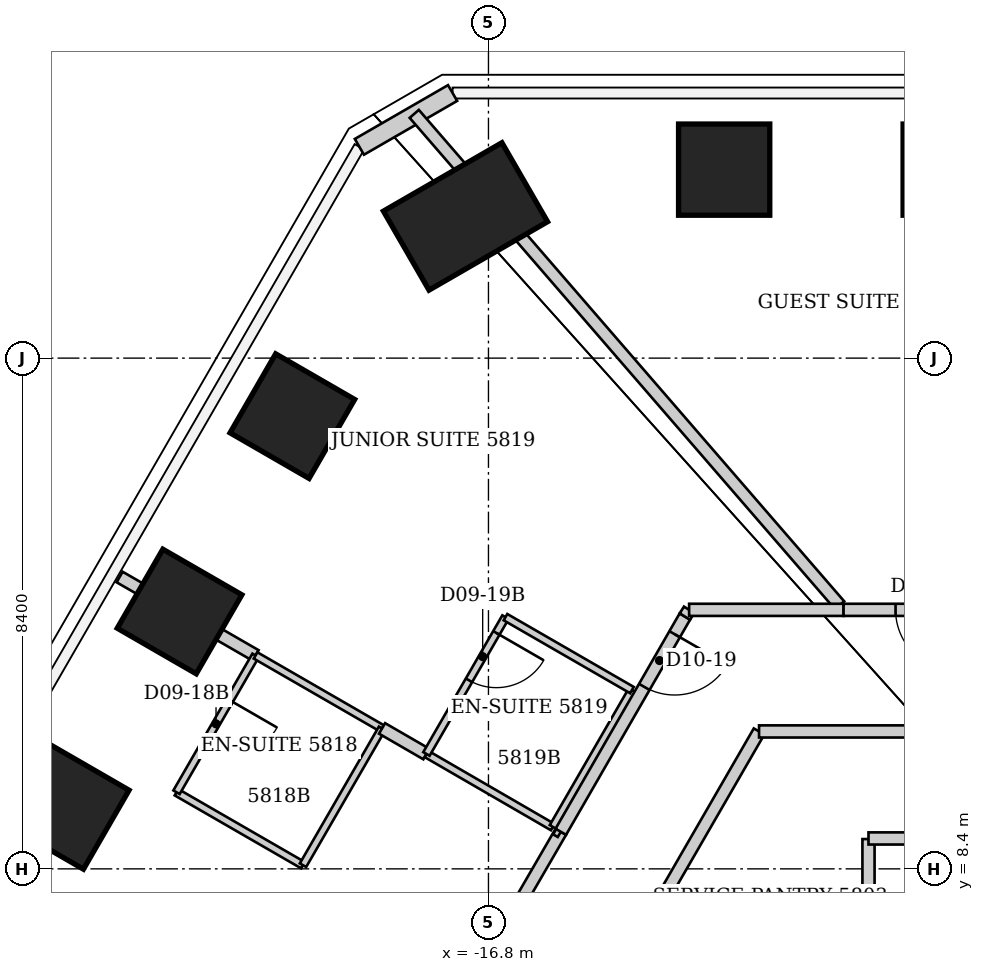
"""IFC4 building model, lengths in metres.
Left out: names, types, materials, properties, quantities, classifications, styles, units other than length and angle.
Written with IfcOpenShell. Run it as: python <this file> out.ifc"""

import sys

from ifc_helpers import new_model, si_unit, direction, frame, frame_2d, origin, origin_2d, place, context, subcontext, project, spatial, rectangle, extrude, element, fill, save


model = new_model("IFC4")
c1 = context("Model", 3, precision=1e-05, world=origin(), true_north=direction((0.0, 1.0)))
c2 = subcontext(c1, "Body", "Model", "MODEL_VIEW")
j1 = project(units=[si_unit("LENGTHUNIT", "METRE"), si_unit("PLANEANGLEUNIT", "RADIAN")], contexts=[c1])
p1 = place(None, origin())
s1 = spatial("IfcSite", under=j1, at=p1, CompositionType="ELEMENT")
p2 = place(p1, origin())
s2 = spatial("IfcBuilding", under=s1, at=p2, CompositionType="ELEMENT")
p3 = place(p2, frame((0.0, 0.0, 232.6)))
s3 = spatial("IfcBuildingStorey", under=s2, at=p3, CompositionType="ELEMENT", Elevation=232.6)
p4 = place(p3, frame((-12.924, 19.9, -0.068), z_axis=(0.035465370418, -0.05455241702, 0.997880875304), x_axis=(0.001454113511, 0.998510791345, 0.054535173247)))
e1 = element("IfcColumn", 1, at=p4, inside=s3, PredefinedType="COLUMN", context=c2, shape_type="SweptSolid", body=[
    extrude(rectangle(XDim=1.5, YDim=1.5, at=origin_2d()), origin(), (0.0, 0.0, 1.0), 3.876),
])
p5 = place(p3, frame((-9.231, 19.9, -0.06), z_axis=(0.025317785915, -0.054550042471, 0.998190013265), x_axis=(0.001183738063, 0.998511018064, 0.054537561078)))
e2 = element("IfcColumn", 2, at=p5, inside=s3, PredefinedType="COLUMN", context=c2, shape_type="SweptSolid", body=[
    extrude(rectangle(XDim=1.5, YDim=1.5, at=origin_2d()), origin(), (0.0, 0.0, 1.0), 3.867),
])
p6 = place(p3, frame((-23.735, 9.419, -0.059), z_axis=(0.064004664797, -0.025374630423, 0.997626949824), x_axis=(-0.863841955807, 0.499136409128, 0.068116961699)))
e3 = element("IfcColumn", 3, at=p6, inside=s3, PredefinedType="COLUMN", context=c2, shape_type="SweptSolid", body=[
    extrude(rectangle(XDim=1.5, YDim=1.5, at=origin_2d()), origin(), (0.0, 0.0, 1.0), 3.868),
])
p7 = place(p3, frame((-21.88, 12.633, -0.051), z_axis=(0.059073478929, -0.034090583664, 0.99767136683), x_axis=(-0.86410694155, 0.498665569053, 0.068204426596)))
e4 = element("IfcColumn", 4, at=p7, inside=s3, PredefinedType="COLUMN", context=c2, shape_type="SweptSolid", body=[
    extrude(rectangle(XDim=1.5, YDim=1.5, at=origin_2d()), origin(), (0.0, 0.0, 1.0), 3.86),
])
p8 = place(p3, frame((-20.025, 15.846, -0.059), z_axis=(0.054031269339, -0.042795795107, 0.997621742874), x_axis=(-0.86412054036, 0.498643763079, 0.068191563044)))
e5 = element("IfcColumn", 5, at=p8, inside=s3, PredefinedType="COLUMN", context=c2, shape_type="SweptSolid", body=[
    extrude(rectangle(XDim=1.5, YDim=1.5, at=origin_2d()), origin(), (0.0, 0.0, 1.0), 3.868),
])
p9 = place(p3, frame((-17.178, 19.131, -0.069), z_axis=(0.047462720367, -0.052876240197, 0.997472502577), x_axis=(-0.497750920441, 0.864529877343, 0.069513397134)))
e6 = element("IfcColumn", 6, at=p9, inside=s3, PredefinedType="COLUMN", context=c2, shape_type="SweptSolid", body=[
    extrude(rectangle(XDim=1.5, YDim=2.25, at=origin_2d()), origin(), (0.0, 0.0, 1.0), 3.878),
])
p10 = place(p3, frame((-18.923, 20.275, 0.0), z_axis=(0.0, 0.0, 1.0), x_axis=(0.866036293601, 0.499981137809, 0.0)))
e7 = element("IfcWall", 7, at=p10, inside=s3, PredefinedType="SOLIDWALL", context=c2, shape_type="SweptSolid", body=[
    extrude(rectangle(XDim=1.77, YDim=0.3, at=frame_2d((0.885, 0.0))), origin(), (0.0, 0.0, 1.0), 3.64),
])
p11 = place(p3, frame((-22.866, 13.2, 0.0), z_axis=(0.0, 0.0, 1.0), x_axis=(0.866187160499, -0.499719724432, 0.0)))
e8 = element("IfcWall", 8, at=p11, inside=s3, PredefinedType="PARTITIONING", context=c2, shape_type="SweptSolid", body=[
    extrude(rectangle(XDim=2.582, YDim=0.2, at=frame_2d((1.291, 0.0))), origin(), (0.0, 0.0, 1.0), 3.64),
])
p12 = place(p3, frame((-21.93, 9.66, 0.0), z_axis=(0.0, 0.0, 1.0), x_axis=(0.866177122335, -0.499737123639, 0.0)))
e9 = element("IfcWall", 9, at=p12, inside=s3, PredefinedType="PARTITIONING", context=c2, shape_type="SweptSolid", body=[
    extrude(rectangle(XDim=2.401, YDim=0.12, at=frame_2d((1.201, 0.0))), origin(), (0.0, 0.0, 1.0), 3.64),
])
p13 = place(p3, frame((-20.63, 11.91, 0.0), z_axis=(0.0, 0.0, 1.0), x_axis=(-0.500291685314, -0.865856933682, 0.0)))
e10 = element("IfcWall", 10, at=p13, inside=s3, PredefinedType="PARTITIONING", context=c2, shape_type="SweptSolid", body=[
    extrude(rectangle(XDim=2.599, YDim=0.12, at=frame_2d((1.299, 0.0))), origin(), (0.0, 0.0, 1.0), 3.64),
])
p14 = place(p13, frame((0.85, 0.0, 0.0)))
e11 = element("IfcOpeningElement", 11, at=p14, cuts=e10, PredefinedType="OPENING", context=c2, shape_type="SweptSolid", body=[
    extrude(rectangle(XDim=0.9, YDim=2.03, at=frame_2d((0.45, 1.015))), frame((0.0, 0.06, 0.0), z_axis=(0.0, -1.0, 0.0), x_axis=(1.0, 0.0, 0.0)), (0.0, 0.0, 1.0), 0.12),
])
p15 = place(p3, frame((-20.63, 11.91, 0.0), z_axis=(0.0, 0.0, 1.0), x_axis=(0.866177122335, -0.499737123639, 0.0)))
e12 = element("IfcWall", 12, at=p15, inside=s3, PredefinedType="PARTITIONING", context=c2, shape_type="SweptSolid", body=[
    extrude(rectangle(XDim=2.401, YDim=0.12, at=frame_2d((1.201, 0.0))), origin(), (0.0, 0.0, 1.0), 2.878),
])
p16 = place(p3, frame((-19.85, 8.46, 0.0), z_axis=(0.0, 0.0, 1.0), x_axis=(0.500291685314, 0.865856933682, 0.0)))
e13 = element("IfcWall", 13, at=p16, inside=s3, PredefinedType="PARTITIONING", context=c2, shape_type="SweptSolid", body=[
    extrude(rectangle(XDim=2.599, YDim=0.12, at=frame_2d((1.299, 0.0))), origin(), (0.0, 0.0, 1.0), 3.64),
])
p17 = place(p3, frame((-18.55, 10.71, 0.0), z_axis=(0.0, 0.0, 1.0), x_axis=(0.865717170405, -0.500533496247, 0.0)))
e14 = element("IfcWall", 14, at=p17, inside=s3, PredefinedType="PARTITIONING", context=c2, shape_type="SweptSolid", body=[
    extrude(rectangle(XDim=0.842, YDim=0.2, at=frame_2d((0.421, 0.0))), origin(), (0.0, 0.0, 1.0), 2.878),
])
p18 = place(p3, frame((-17.82, 10.29, 0.0), z_axis=(0.0, 0.0, 1.0), x_axis=(0.86531257009, -0.501232636652, 0.0)))
e15 = element("IfcWall", 15, at=p18, inside=s3, PredefinedType="PARTITIONING", context=c2, shape_type="SweptSolid", body=[
    extrude(rectangle(XDim=2.401, YDim=0.12, at=frame_2d((1.201, 0.0))), origin(), (0.0, 0.0, 1.0), 2.878),
])
p19 = place(p3, frame((-17.72, 5.37, 0.0), z_axis=(0.0, 0.0, 1.0), x_axis=(0.501491408171, 0.865162624904, 0.0)))
e16 = element("IfcWall", 16, at=p19, inside=s3, PredefinedType="PARTITIONING", context=c2, shape_type="SweptSolid", body=[
    extrude(rectangle(XDim=4.207, YDim=0.2, at=frame_2d((2.104, 0.0))), origin(), (0.0, 0.0, 1.0), 3.64),
])
p20 = place(p19, frame((1.604, 0.0, 0.0)))
e17 = element("IfcOpeningElement", 17, at=p20, cuts=e16, PredefinedType="OPENING", context=c2, shape_type="SweptSolid", body=[
    extrude(rectangle(XDim=1.0, YDim=2.13, at=frame_2d((0.5, 1.065))), frame((0.0, 0.1, 0.0), z_axis=(0.0, -1.0, 0.0), x_axis=(1.0, 0.0, 0.0)), (0.0, 0.0, 1.0), 0.2),
])
p21 = place(p3, frame((-16.52, 12.54, 0.0), z_axis=(0.0, 0.0, 1.0), x_axis=(-0.500291685314, -0.865856933682, 0.0)))
e18 = element("IfcWall", 18, at=p21, inside=s3, PredefinedType="PARTITIONING", context=c2, shape_type="SweptSolid", body=[
    extrude(rectangle(XDim=2.599, YDim=0.12, at=frame_2d((1.299, 0.0))), origin(), (0.0, 0.0, 1.0), 3.64),
])
p22 = place(p21, frame((0.3, 0.0, 0.0)))
e19 = element("IfcOpeningElement", 19, at=p22, cuts=e18, PredefinedType="OPENING", context=c2, shape_type="SweptSolid", body=[
    extrude(rectangle(XDim=0.9, YDim=2.03, at=frame_2d((0.45, 1.015))), frame((0.0, 0.06, 0.0), z_axis=(0.0, -1.0, 0.0), x_axis=(1.0, 0.0, 0.0)), (0.0, 0.0, 1.0), 0.12),
])
p23 = place(p3, frame((-15.74, 9.09, 0.0), z_axis=(0.0, 0.0, 1.0), x_axis=(0.500291685314, 0.865856933682, 0.0)))
e20 = element("IfcWall", 20, at=p23, inside=s3, PredefinedType="PARTITIONING", context=c2, shape_type="SweptSolid", body=[
    extrude(rectangle(XDim=2.599, YDim=0.12, at=frame_2d((1.299, 0.0))), origin(), (0.0, 0.0, 1.0), 3.64),
])
p24 = place(p3, frame((-15.686, 9.054, 0.0), z_axis=(0.0, 0.0, 1.0), x_axis=(0.86478894661, -0.502135517387, 0.0)))
e21 = element("IfcWall", 21, at=p24, inside=s3, PredefinedType="PARTITIONING", context=c2, shape_type="SweptSolid", body=[
    extrude(rectangle(XDim=0.087, YDim=0.2, at=frame_2d((0.044, 0.0))), origin(), (0.0, 0.0, 1.0), 3.64),
])
p25 = place(p3, frame((-15.61, 9.01, 0.0), z_axis=(0.0, 0.0, 1.0), x_axis=(0.499301665038, 0.866428212428, 0.0)))
e22 = element("IfcWall", 22, at=p25, inside=s3, PredefinedType="PARTITIONING", context=c2, shape_type="SweptSolid", body=[
    extrude(rectangle(XDim=4.086, YDim=0.2, at=frame_2d((2.043, 0.0))), origin(), (0.0, 0.0, 1.0), 3.64),
])
p26 = place(p25, frame((2.75, 0.0, 0.0)))
e23 = element("IfcOpeningElement", 23, at=p26, cuts=e22, PredefinedType="OPENING", context=c2, shape_type="SweptSolid", body=[
    extrude(rectangle(XDim=1.0, YDim=2.13, at=frame_2d((0.5, 1.065))), frame((0.0, 0.1, 0.0), z_axis=(0.0, -1.0, 0.0), x_axis=(1.0, 0.0, 0.0)), (0.0, 0.0, 1.0), 0.2),
])
p27 = place(p3, frame((-14.99, 6.09, 0.0), z_axis=(0.0, 0.0, 1.0), x_axis=(0.500213626659, 0.86590203124, 0.0)))
e24 = element("IfcWall", 24, at=p27, inside=s3, PredefinedType="PARTITIONING", context=c2, shape_type="SweptSolid", body=[
    extrude(rectangle(XDim=5.278, YDim=0.2, at=frame_2d((2.639, 0.0))), origin(), (0.0, 0.0, 1.0), 3.64),
])
p28 = place(p3, frame((-14.44, 11.34, 0.0), z_axis=(0.0, 0.0, 1.0), x_axis=(-0.866202511239, 0.499693115345, 0.0)))
e25 = element("IfcWall", 25, at=p28, inside=s3, PredefinedType="PARTITIONING", context=c2, shape_type="SweptSolid", body=[
    extrude(rectangle(XDim=2.401, YDim=0.12, at=frame_2d((1.201, 0.0))), origin(), (0.0, 0.0, 1.0), 3.64),
])
p29 = place(p3, frame((-13.5, 12.66, 0.0), z_axis=(0.0, 0.0, 1.0), x_axis=(-0.537723852201, -0.843121022614, 0.0)))
e26 = element("IfcWall", 26, at=p29, inside=s3, PredefinedType="PARTITIONING", context=c2, shape_type="SweptSolid", body=[
    extrude(rectangle(XDim=0.13, YDim=0.2, at=frame_2d((0.065, 0.0))), origin(), (0.0, 0.0, 1.0), 3.64),
])
p30 = place(p3, frame((-12.35, 10.66, 0.0), z_axis=(0.0, 0.0, 1.0), x_axis=(1.0, 0.0, 0.0)))
e27 = element("IfcWall", 27, at=p30, inside=s3, PredefinedType="PARTITIONING", context=c2, shape_type="SweptSolid", body=[
    extrude(rectangle(XDim=7.75, YDim=0.2, at=frame_2d((3.875, 0.0))), origin(), (0.0, 0.0, 1.0), 3.64),
])
p31 = place(p30, frame((3.325, 0.0, 0.0)))
e28 = element("IfcOpeningElement", 28, at=p31, cuts=e27, PredefinedType="OPENING", context=c2, shape_type="SweptSolid", body=[
    extrude(rectangle(XDim=1.1, YDim=2.2, at=frame_2d((0.55, 1.1))), frame((0.0, 0.1, 0.0), z_axis=(0.0, -1.0, 0.0), x_axis=(1.0, 0.0, 0.0)), (0.0, 0.0, 1.0), 0.2),
])
p32 = place(p3, frame((-11.025, 12.736, 0.0), z_axis=(0.0, 0.0, 1.0), x_axis=(-0.654431245438, 0.756121514702, 0.0)))
e29 = element("IfcWall", 29, at=p32, inside=s3, PredefinedType="PARTITIONING", context=c2, shape_type="SweptSolid", body=[
    extrude(rectangle(XDim=10.688, YDim=0.2, at=frame_2d((5.344, 0.0))), origin(), (0.0, 0.0, 1.0), 3.64),
])
p33 = place(p3, frame((-10.96, 12.66, 0.0), z_axis=(0.0, 0.0, 1.0), x_axis=(-1.0, 0.0, 0.0)))
e30 = element("IfcWall", 30, at=p33, inside=s3, PredefinedType="PARTITIONING", context=c2, shape_type="SweptSolid", body=[
    extrude(rectangle(XDim=2.54, YDim=0.2, at=frame_2d((1.27, 0.0))), origin(), (0.0, 0.0, 1.0), 3.64),
])
p34 = place(p3, frame((-10.55, 8.89, 0.0), z_axis=(0.0, 0.0, 1.0), x_axis=(0.0, -1.0, 0.0)))
e31 = element("IfcWall", 31, at=p34, inside=s3, PredefinedType="PARTITIONING", context=c2, shape_type="SweptSolid", body=[
    extrude(rectangle(XDim=2.8, YDim=0.2, at=frame_2d((1.4, 0.0))), origin(), (0.0, 0.0, 1.0), 3.64),
])
p35 = place(p3, frame((-8.25, 12.66, 0.0), z_axis=(0.0, 0.0, 1.0), x_axis=(-1.0, 0.0, 0.0)))
e32 = element("IfcWall", 32, at=p35, inside=s3, PredefinedType="PARTITIONING", context=c2, shape_type="SweptSolid", body=[
    extrude(rectangle(XDim=2.71, YDim=0.2, at=frame_2d((1.355, 0.0))), origin(), (0.0, 0.0, 1.0), 3.64),
])
p36 = place(p35, frame((0.855, 0.0, 0.0)))
e33 = element("IfcOpeningElement", 33, at=p36, cuts=e32, PredefinedType="OPENING", context=c2, shape_type="SweptSolid", body=[
    extrude(rectangle(XDim=1.0, YDim=2.13, at=frame_2d((0.5, 1.065))), frame((0.0, 0.1, 0.0), z_axis=(0.0, -1.0, 0.0), x_axis=(1.0, 0.0, 0.0)), (0.0, 0.0, 1.0), 0.2),
])
p37 = place(p3, frame((-4.6, 8.9, 0.0), z_axis=(0.0, 0.0, 1.0), x_axis=(-1.0, 0.0, 0.0)))
e34 = element("IfcWall", 34, at=p37, inside=s3, PredefinedType="PARTITIONING", context=c2, shape_type="SweptSolid", body=[
    extrude(rectangle(XDim=5.95, YDim=0.2, at=frame_2d((2.975, 0.0))), origin(), (0.0, 0.0, 1.0), 3.64),
])
p38 = place(p36, origin())
e35 = element("IfcDoor", 35, at=p38, inside=s3, OperationType="SINGLE_SWING_LEFT", PredefinedType="DOOR", context=c2, shape_type="SweptSolid", body=[
    extrude(rectangle(XDim=1.0, YDim=2.13, at=frame_2d((0.5, 1.065))), frame((0.0, 0.025, 0.0), z_axis=(0.0, -1.0, 0.0), x_axis=(1.0, 0.0, 0.0)), (0.0, 0.0, 1.0), 0.05),
])
fill(e33, e35)
p39 = place(p14, origin())
e36 = element("IfcDoor", 36, at=p39, inside=s3, OperationType="SINGLE_SWING_LEFT", PredefinedType="DOOR", context=c2, shape_type="SweptSolid", body=[
    extrude(rectangle(XDim=0.9, YDim=2.03, at=frame_2d((0.45, 1.015))), frame((0.0, 0.025, 0.0), z_axis=(0.0, -1.0, 0.0), x_axis=(1.0, 0.0, 0.0)), (0.0, 0.0, 1.0), 0.05),
])
fill(e11, e36)
p40 = place(p26, origin())
e37 = element("IfcDoor", 37, at=p40, inside=s3, OperationType="SINGLE_SWING_RIGHT", PredefinedType="DOOR", context=c2, shape_type="SweptSolid", body=[
    extrude(rectangle(XDim=1.0, YDim=2.13, at=frame_2d((0.5, 1.065))), frame((0.0, 0.025, 0.0), z_axis=(0.0, -1.0, 0.0), x_axis=(1.0, 0.0, 0.0)), (0.0, 0.0, 1.0), 0.05),
])
fill(e23, e37)
p41 = place(p22, origin())
e38 = element("IfcDoor", 38, at=p41, inside=s3, OperationType="SINGLE_SWING_LEFT", PredefinedType="DOOR", context=c2, shape_type="SweptSolid", body=[
    extrude(rectangle(XDim=0.9, YDim=2.03, at=frame_2d((0.45, 1.015))), frame((0.0, 0.025, 0.0), z_axis=(0.0, -1.0, 0.0), x_axis=(1.0, 0.0, 0.0)), (0.0, 0.0, 1.0), 0.05),
])
fill(e19, e38)
save(model, sys.argv[1])
